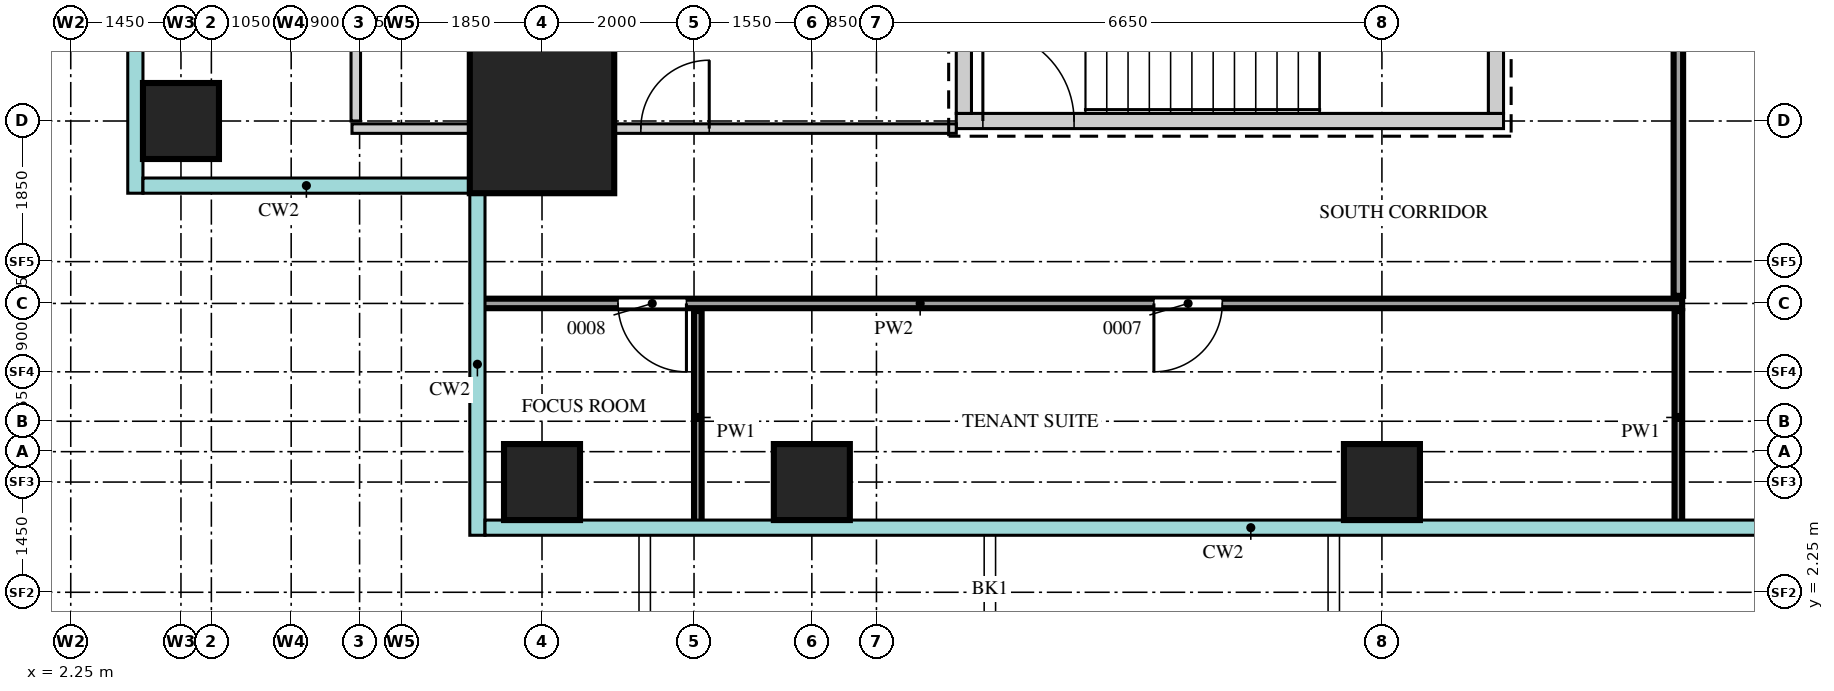
"""IFC4 building model, lengths in metres.
Left out: names, types, materials, properties, quantities, classifications, styles, units other than length and angle.
Written with IfcOpenShell. Run it as: python <this file> out.ifc"""

import sys

from ifc_helpers import new_model, si_unit, direction, frame, frame_2d, origin, origin_2d, place, context, subcontext, project, spatial, rectangle, extrude, source, transform, mapped, element, fill, save


model = new_model("IFC4")
c1 = context("Model", 3, precision=1e-05, world=origin(), true_north=direction((0.0, 1.0)))
c2 = subcontext(c1, "Body", "Model", "MODEL_VIEW")
j1 = project(units=[si_unit("LENGTHUNIT", "METRE"), si_unit("PLANEANGLEUNIT", "RADIAN")], contexts=[c1])
p1 = place(None, origin())
s1 = spatial("IfcSite", under=j1, at=p1, CompositionType="ELEMENT")
p2 = place(p1, origin())
s2 = spatial("IfcBuilding", under=s1, at=p2, CompositionType="ELEMENT")
p3 = place(p2, frame((0.0, 0.0, 180.7)))
s3 = spatial("IfcBuildingStorey", under=s2, at=p3, CompositionType="ELEMENT", Elevation=180.7)
m1 = source(origin(), c2, "Body", "SweptSolid", [
    extrude(rectangle(XDim=7.2, YDim=0.2, at=frame_2d((3.6, 0.0))), origin(), (0.0, 0.0, 1.0), 3.75),
])
p4 = place(p3, frame((13.9, 8.45, 0.0), z_axis=(0.0, 0.0, 1.0), x_axis=(1.0, 0.0, 0.0)))
e1 = element("IfcWall", 1, at=p4, inside=s3, PredefinedType="SHEAR", context=c2, shape_type="MappedRepresentation", body=[
    mapped(m1, transform((0.0, 0.0, 0.0))),
])
m2 = source(origin(), c2, "Body", "SweptSolid", [
    extrude(rectangle(XDim=1.2, YDim=2.1, at=frame_2d((0.6, 1.05))), frame((0.0, 0.11, 0.0), z_axis=(0.0, -1.0, 0.0), x_axis=(1.0, 0.0, 0.0)), (0.0, 0.0, 1.0), 0.22),
])
p5 = place(p4, frame((0.35, 0.0, 0.0)))
e2 = element("IfcOpeningElement", 2, at=p5, cuts=e1, PredefinedType="OPENING", context=c2, shape_type="MappedRepresentation", body=[
    mapped(m2, transform((0.0, 0.0, 0.0))),
])
m3 = source(origin(), c2, "Body", "SweptSolid", [
    extrude(rectangle(XDim=3.35, YDim=0.2, at=frame_2d((1.675, 0.0))), origin(), (0.0, 0.0, 1.0), 3.75),
])
for number, where, z_axis, x_axis in (
    (3, (21.0, 8.55, 0.0), (0.0, 0.0, 1.0), (0.0, 1.0, 0.0)),
    (4, (14.0, 8.55, 0.0), (0.0, 0.0, 1.0), (0.0, 1.0, 0.0)),
):
    element("IfcWall", number, at=place(p3, frame(where, z_axis=z_axis, x_axis=x_axis)), inside=s3, PredefinedType="SHEAR", context=c2, shape_type="MappedRepresentation", body=[
        mapped(m3, transform((0.0, 0.0, 0.0))),
    ])
m4 = source(origin(), c2, "Body", "SweptSolid", [
    extrude(rectangle(XDim=1.9, YDim=1.9, at=origin_2d()), origin(), (0.0, 0.0, 1.0), 4.0),
])
p6 = place(p3, frame((8.45, 8.45, 0.0), z_axis=(0.0, 0.0, 1.0), x_axis=(1.0, 0.0, 0.0)))
e5 = element("IfcColumn", 5, at=p6, inside=s3, PredefinedType="COLUMN", context=c2, shape_type="MappedRepresentation", body=[
    mapped(m4, transform((0.0, 0.0, 0.0))),
])
m5 = source(origin(), c2, "Body", "SweptSolid", [
    extrude(rectangle(XDim=1.0, YDim=1.0, at=origin_2d()), origin(), (0.0, 0.0, 1.0), 3.75),
])
for number, where, z_axis, x_axis in (
    (6, (8.45, 3.7, 0.0), (0.0, 0.0, 1.0), (1.0, 0.0, 0.0)),
    (7, (12.0, 3.7, 0.0), (0.0, 0.0, 1.0), (1.0, 0.0, 0.0)),
    (8, (19.5, 3.7, 0.0), (0.0, 0.0, 1.0), (1.0, 0.0, 0.0)),
    (9, (3.7, 8.45, 0.0), (0.0, 0.0, 1.0), (1.0, 0.0, 0.0)),
):
    element("IfcColumn", number, at=place(p3, frame(where, z_axis=z_axis, x_axis=x_axis)), inside=s3, PredefinedType="COLUMN", context=c2, shape_type="MappedRepresentation", body=[
        mapped(m5, transform((0.0, 0.0, 0.0))),
    ])
m6 = source(origin(), c2, "Body", "SweptSolid", [
    extrude(rectangle(XDim=2.8, YDim=0.1, at=frame_2d((1.4, 0.0))), origin(), (0.0, 0.0, 1.0), 3.8),
])
for number, where, z_axis, x_axis in (
    (10, (10.5, 3.15, 0.0), (0.0, 0.0, 1.0), (0.0, 1.0, 0.0)),
    (11, (23.4, 3.15, 0.0), (0.0, 0.0, 1.0), (0.0, 1.0, 0.0)),
):
    element("IfcWall", number, at=place(p3, frame(where, z_axis=z_axis, x_axis=x_axis)), inside=s3, PredefinedType="PARTITIONING", context=c2, shape_type="MappedRepresentation", body=[
        mapped(m6, transform((0.0, 0.0, 0.0))),
    ])
m7 = source(origin(), c2, "Body", "SweptSolid", [
    extrude(rectangle(XDim=15.8, YDim=0.125, at=frame_2d((7.9, 0.0))), origin(), (0.0, 0.0, 1.0), 3.8),
])
p7 = place(p3, frame((7.65, 6.05, 0.0), z_axis=(0.0, 0.0, 1.0), x_axis=(1.0, 0.0, 0.0)))
e12 = element("IfcWall", 12, at=p7, inside=s3, PredefinedType="PARTITIONING", context=c2, shape_type="MappedRepresentation", body=[
    mapped(m7, transform((0.0, 0.0, 0.0))),
])
m8 = source(origin(), c2, "Body", "SweptSolid", [
    extrude(rectangle(XDim=0.9, YDim=2.1, at=frame_2d((0.45, 1.05))), frame((0.0, 0.073, 0.0), z_axis=(0.0, -1.0, 0.0), x_axis=(1.0, 0.0, 0.0)), (0.0, 0.0, 1.0), 0.145),
])
p8 = place(p7, frame((1.8, 0.0, 0.0)))
e13 = element("IfcOpeningElement", 13, at=p8, cuts=e12, PredefinedType="OPENING", context=c2, shape_type="MappedRepresentation", body=[
    mapped(m8, transform((0.0, 0.0, 0.0))),
])
p9 = place(p7, frame((8.85, 0.0, 0.0)))
e14 = element("IfcOpeningElement", 14, at=p9, cuts=e12, PredefinedType="OPENING", context=c2, shape_type="MappedRepresentation", body=[
    mapped(m8, transform((0.0, 0.0, 0.0))),
])
m9 = source(origin(), c2, "Body", "SweptSolid", [
    extrude(rectangle(XDim=14.75, YDim=0.125, at=frame_2d((7.375, 0.0))), origin(), (0.0, 0.0, 1.0), 3.8),
])
p10 = place(p3, frame((23.4, 6.15, 0.0), z_axis=(0.0, 0.0, 1.0), x_axis=(0.0, 1.0, 0.0)))
e15 = element("IfcWall", 15, at=p10, inside=s3, PredefinedType="PARTITIONING", context=c2, shape_type="MappedRepresentation", body=[
    mapped(m9, transform((0.0, 0.0, 0.0))),
])
p11 = place(p10, frame((7.95, 0.0, 0.0)))
e16 = element("IfcOpeningElement", 16, at=p11, cuts=e15, PredefinedType="OPENING", context=c2, shape_type="MappedRepresentation", body=[
    mapped(m8, transform((0.0, 0.0, 0.0))),
])
m10 = source(origin(), c2, "Body", "SweptSolid", [
    extrude(rectangle(XDim=7.95, YDim=0.125, at=frame_2d((3.975, 0.0))), origin(), (0.0, 0.0, 1.0), 3.25),
])
p12 = place(p3, frame((5.95, 8.35, 0.0), z_axis=(0.0, 0.0, 1.0), x_axis=(1.0, 0.0, 0.0)))
e17 = element("IfcWall", 17, at=p12, inside=s3, PredefinedType="PARTITIONING", context=c2, shape_type="MappedRepresentation", body=[
    mapped(m10, transform((0.0, 0.0, 0.0))),
])
p13 = place(p12, frame((3.8, 0.0, 0.0)))
e18 = element("IfcOpeningElement", 18, at=p13, cuts=e17, PredefinedType="OPENING", context=c2, shape_type="MappedRepresentation", body=[
    mapped(m8, transform((0.0, 0.0, 0.0))),
])
m11 = source(origin(), c2, "Body", "SweptSolid", [
    extrude(rectangle(XDim=4.05, YDim=0.125, at=frame_2d((2.025, 0.0))), origin(), (0.0, 0.0, 1.0), 3.8),
])
p14 = place(p3, frame((6.0, 8.45, 0.0), z_axis=(0.0, 0.0, 1.0), x_axis=(0.0, 1.0, 0.0)))
e19 = element("IfcWall", 19, at=p14, inside=s3, PredefinedType="PARTITIONING", context=c2, shape_type="MappedRepresentation", body=[
    mapped(m11, transform((0.0, 0.0, 0.0))),
])
m12 = source(origin(), c2, "Body", "SweptSolid", [
    extrude(rectangle(XDim=0.9, YDim=2.1, at=frame_2d((0.45, 1.05))), frame((0.0, 0.025, 0.0), z_axis=(0.0, -1.0, 0.0), x_axis=(1.0, 0.0, 0.0)), (0.0, 0.0, 1.0), 0.05),
])
p15 = place(p13, origin())
e20 = element("IfcDoor", 20, at=p15, inside=s3, OperationType="SINGLE_SWING_LEFT", PredefinedType="DOOR", context=c2, shape_type="MappedRepresentation", body=[
    mapped(m12, transform((0.0, 0.0, 0.0))),
])
fill(e18, e20)
p16 = place(p8, origin())
e21 = element("IfcDoor", 21, at=p16, inside=s3, OperationType="SINGLE_SWING_RIGHT", PredefinedType="DOOR", context=c2, shape_type="MappedRepresentation", body=[
    mapped(m12, transform((0.0, 0.0, 0.0))),
])
fill(e13, e21)
p17 = place(p9, origin())
e22 = element("IfcDoor", 22, at=p17, inside=s3, OperationType="SINGLE_SWING_LEFT", PredefinedType="DOOR", context=c2, shape_type="MappedRepresentation", body=[
    mapped(m12, transform((0.0, 0.0, 0.0))),
])
fill(e14, e22)
m13 = source(origin(), c2, "Body", "SweptSolid", [
    extrude(rectangle(XDim=1.2, YDim=2.1, at=frame_2d((0.6, 1.05))), frame((0.0, 0.025, 0.0), z_axis=(0.0, -1.0, 0.0), x_axis=(1.0, 0.0, 0.0)), (0.0, 0.0, 1.0), 0.05),
])
p18 = place(p5, origin())
e23 = element("IfcDoor", 23, at=p18, inside=s3, OperationType="SINGLE_SWING_RIGHT", PredefinedType="DOOR", context=c2, shape_type="MappedRepresentation", body=[
    mapped(m13, transform((0.0, 0.0, 0.0))),
])
fill(e2, e23)
save(model, sys.argv[1])
